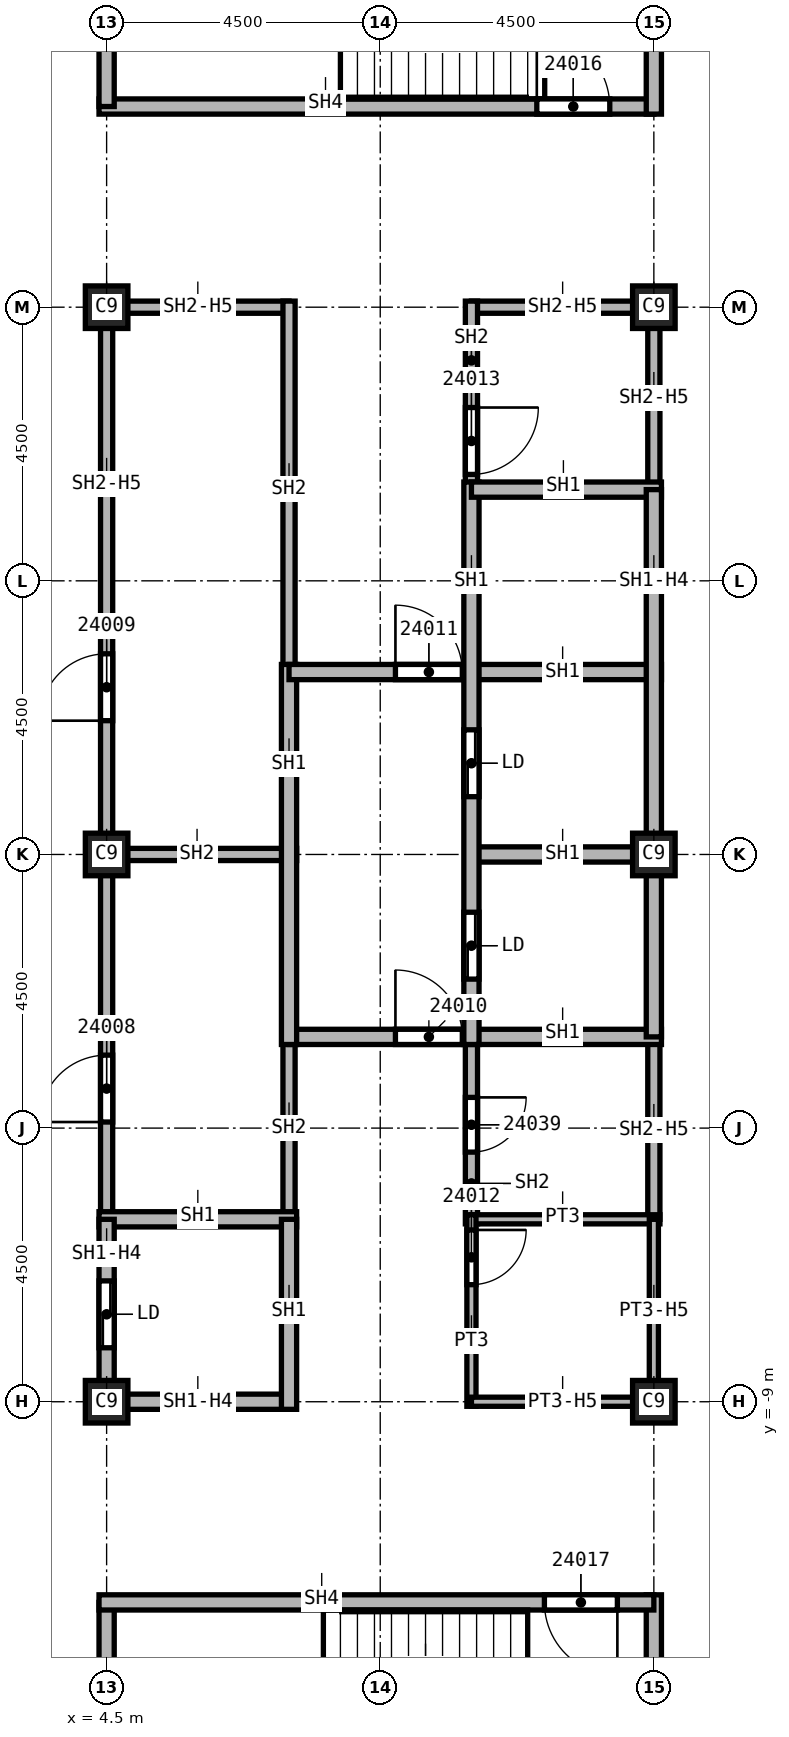
"""IFC4 building model, lengths in metres.
Left out: names, types, materials, properties, quantities, classifications, styles, units other than length and angle.
Written with IfcOpenShell. Run it as: python <this file> out.ifc"""

import sys

from ifc_helpers import new_model, si_unit, direction, frame, frame_2d, origin, origin_2d, place, context, subcontext, project, spatial, rectangle, extrude, element, fill, save


model = new_model("IFC4")
c1 = context("Model", 3, precision=1e-05, world=origin(), true_north=direction((0.0, 1.0)))
c2 = subcontext(c1, "Body", "Model", "MODEL_VIEW")
j1 = project(units=[si_unit("LENGTHUNIT", "METRE"), si_unit("PLANEANGLEUNIT", "RADIAN")], contexts=[c1])
p1 = place(None, origin())
s1 = spatial("IfcSite", under=j1, at=p1, CompositionType="ELEMENT")
p2 = place(p1, origin())
s2 = spatial("IfcBuilding", under=s1, at=p2, CompositionType="ELEMENT")
p3 = place(p2, frame((0.0, 0.0, 346.0)))
s3 = spatial("IfcBuildingStorey", under=s2, at=p3, CompositionType="ELEMENT", Elevation=346.0)
for number, where, z_axis, x_axis in (
    (1, (4.5, 0.0, 0.0), (0.0, 0.0, 1.0), (1.0, 0.0, 0.0)),
    (2, (4.5, 9.0, 0.0), (0.0, 0.0, 1.0), (1.0, 0.0, 0.0)),
    (3, (4.5, -9.0, 0.0), (0.0, 0.0, 1.0), (1.0, 0.0, 0.0)),
    (4, (13.5, 0.0, 0.0), (0.0, 0.0, 1.0), (1.0, 0.0, 0.0)),
    (5, (13.5, 9.0, 0.0), (0.0, 0.0, 1.0), (1.0, 0.0, 0.0)),
    (6, (13.5, -9.0, 0.0), (0.0, 0.0, 1.0), (1.0, 0.0, 0.0)),
):
    element("IfcColumn", number, at=place(p3, frame(where, z_axis=z_axis, x_axis=x_axis)), inside=s3, PredefinedType="COLUMN", context=c2, shape_type="SweptSolid", body=[
        extrude(rectangle(XDim=0.7, YDim=0.7, at=origin_2d()), origin(), (0.0, 0.0, 1.0), 3.59),
    ])
p4 = place(p3, frame((4.4, 0.0, 0.0), z_axis=(0.0, 0.0, 1.0), x_axis=(1.0, 0.0, 0.0)))
e7 = element("IfcWall", 7, at=p4, inside=s3, PredefinedType="SOLIDWALL", context=c2, shape_type="SweptSolid", body=[
    extrude(rectangle(XDim=3.225, YDim=0.2, at=frame_2d((1.613, 0.0))), origin(), (0.0, 0.0, 1.0), 3.59),
])
p5 = place(p3, frame((4.5, -6.0, 0.0), z_axis=(0.0, 0.0, 1.0), x_axis=(0.0, 1.0, 0.0)))
e8 = element("IfcWall", 8, at=p5, inside=s3, PredefinedType="SOLIDWALL", context=c2, shape_type="SweptSolid", body=[
    extrude(rectangle(XDim=15.1, YDim=0.2, at=frame_2d((7.55, 0.0))), origin(), (0.0, 0.0, 1.0), 2.828),
])
p6 = place(p5, frame((1.6, 0.0, 0.0)))
e9 = element("IfcOpeningElement", 9, at=p6, cuts=e8, PredefinedType="OPENING", context=c2, shape_type="SweptSolid", body=[
    extrude(rectangle(XDim=1.1, YDim=2.1, at=frame_2d((0.55, 1.05))), frame((0.0, 0.1, 0.0), z_axis=(0.0, -1.0, 0.0), x_axis=(1.0, 0.0, 0.0)), (0.0, 0.0, 1.0), 0.2),
])
p7 = place(p5, frame((8.2, 0.0, 0.0)))
e10 = element("IfcOpeningElement", 10, at=p7, cuts=e8, PredefinedType="OPENING", context=c2, shape_type="SweptSolid", body=[
    extrude(rectangle(XDim=1.1, YDim=2.1, at=frame_2d((0.55, 1.05))), frame((0.0, 0.1, 0.0), z_axis=(0.0, -1.0, 0.0), x_axis=(1.0, 0.0, 0.0)), (0.0, 0.0, 1.0), 0.2),
])
p8 = place(p3, frame((4.5, 9.0, 0.0), z_axis=(0.0, 0.0, 1.0), x_axis=(1.0, 0.0, 0.0)))
e11 = element("IfcWall", 11, at=p8, inside=s3, PredefinedType="SOLIDWALL", context=c2, shape_type="SweptSolid", body=[
    extrude(rectangle(XDim=3.0, YDim=0.2, at=frame_2d((1.5, 0.0))), origin(), (0.0, 0.0, 1.0), 2.828),
])
p9 = place(p3, frame((7.5, -2.875, 0.0), z_axis=(0.0, 0.0, 1.0), x_axis=(0.0, -1.0, 0.0)))
e12 = element("IfcWall", 12, at=p9, inside=s3, PredefinedType="SOLIDWALL", context=c2, shape_type="SweptSolid", body=[
    extrude(rectangle(XDim=3.125, YDim=0.2, at=frame_2d((1.562, 0.0))), origin(), (0.0, 0.0, 1.0), 3.59),
])
p10 = place(p3, frame((7.5, 9.1, 0.0), z_axis=(0.0, 0.0, 1.0), x_axis=(0.0, -1.0, 0.0)))
e13 = element("IfcWall", 13, at=p10, inside=s3, PredefinedType="SOLIDWALL", context=c2, shape_type="SweptSolid", body=[
    extrude(rectangle(XDim=6.225, YDim=0.2, at=frame_2d((3.113, 0.0))), origin(), (0.0, 0.0, 1.0), 3.59),
])
p11 = place(p3, frame((10.5, -2.875, 0.0), z_axis=(0.0, 0.0, 1.0), x_axis=(0.0, -1.0, 0.0)))
e14 = element("IfcWall", 14, at=p11, inside=s3, PredefinedType="SOLIDWALL", context=c2, shape_type="SweptSolid", body=[
    extrude(rectangle(XDim=3.2, YDim=0.2, at=frame_2d((1.6, 0.0))), origin(), (0.0, 0.0, 1.0), 3.59),
])
p12 = place(p11, frame((1.12, 0.0, 0.0)))
e15 = element("IfcOpeningElement", 15, at=p12, cuts=e14, PredefinedType="OPENING", context=c2, shape_type="SweptSolid", body=[
    extrude(rectangle(XDim=0.9, YDim=2.1, at=frame_2d((0.45, 1.05))), frame((0.0, 0.1, 0.0), z_axis=(0.0, -1.0, 0.0), x_axis=(1.0, 0.0, 0.0)), (0.0, 0.0, 1.0), 0.2),
])
p13 = place(p3, frame((10.5, 9.0, 0.0), z_axis=(0.0, 0.0, 1.0), x_axis=(1.0, 0.0, 0.0)))
e16 = element("IfcWall", 16, at=p13, inside=s3, PredefinedType="SOLIDWALL", context=c2, shape_type="SweptSolid", body=[
    extrude(rectangle(XDim=3.0, YDim=0.2, at=frame_2d((1.5, 0.0))), origin(), (0.0, 0.0, 1.0), 2.828),
])
p14 = place(p3, frame((10.5, 9.1, 0.0), z_axis=(0.0, 0.0, 1.0), x_axis=(0.0, -1.0, 0.0)))
e17 = element("IfcWall", 17, at=p14, inside=s3, PredefinedType="SOLIDWALL", context=c2, shape_type="SweptSolid", body=[
    extrude(rectangle(XDim=3.225, YDim=0.2, at=frame_2d((1.613, 0.0))), origin(), (0.0, 0.0, 1.0), 3.59),
])
p15 = place(p14, frame((1.75, 0.0, 0.0)))
e18 = element("IfcOpeningElement", 18, at=p15, cuts=e17, PredefinedType="OPENING", context=c2, shape_type="SweptSolid", body=[
    extrude(rectangle(XDim=1.1, YDim=2.1, at=frame_2d((0.55, 1.05))), frame((0.0, 0.1, 0.0), z_axis=(0.0, -1.0, 0.0), x_axis=(1.0, 0.0, 0.0)), (0.0, 0.0, 1.0), 0.2),
])
p16 = place(p3, frame((13.5, -3.0, 0.0), z_axis=(0.0, 0.0, 1.0), x_axis=(0.0, -1.0, 0.0)))
e19 = element("IfcWall", 19, at=p16, inside=s3, PredefinedType="SOLIDWALL", context=c2, shape_type="SweptSolid", body=[
    extrude(rectangle(XDim=3.0, YDim=0.2, at=frame_2d((1.5, 0.0))), origin(), (0.0, 0.0, 1.0), 2.828),
])
p17 = place(p3, frame((13.5, 9.1, 0.0), z_axis=(0.0, 0.0, 1.0), x_axis=(0.0, -1.0, 0.0)))
e20 = element("IfcWall", 20, at=p17, inside=s3, PredefinedType="SOLIDWALL", context=c2, shape_type="SweptSolid", body=[
    extrude(rectangle(XDim=3.1, YDim=0.2, at=frame_2d((1.55, 0.0))), origin(), (0.0, 0.0, 1.0), 2.828),
])
p18 = place(p3, frame((4.375, -6.0, 0.0), z_axis=(0.0, 0.0, 1.0), x_axis=(1.0, 0.0, 0.0)))
e21 = element("IfcWall", 21, at=p18, inside=s3, PredefinedType="SOLIDWALL", context=c2, shape_type="SweptSolid", body=[
    extrude(rectangle(XDim=3.25, YDim=0.25, at=frame_2d((1.625, 0.0))), origin(), (0.0, 0.0, 1.0), 3.59),
])
p19 = place(p3, frame((4.5, -9.125, 0.0), z_axis=(0.0, 0.0, 1.0), x_axis=(0.0, 1.0, 0.0)))
e22 = element("IfcWall", 22, at=p19, inside=s3, PredefinedType="SOLIDWALL", context=c2, shape_type="SweptSolid", body=[
    extrude(rectangle(XDim=3.125, YDim=0.25, at=frame_2d((1.562, 0.0))), origin(), (0.0, 0.0, 1.0), 2.828),
])
p20 = place(p19, frame((1.012, 0.0, 0.0)))
e23 = element("IfcOpeningElement", 23, at=p20, cuts=e22, PredefinedType="OPENING", context=c2, shape_type="SweptSolid", body=[
    extrude(rectangle(XDim=1.1, YDim=2.1, at=frame_2d((0.55, 1.05))), frame((0.0, 0.125, 0.0), z_axis=(0.0, -1.0, 0.0), x_axis=(1.0, 0.0, 0.0)), (0.0, 0.0, 1.0), 0.25),
])
p21 = place(p3, frame((7.5, -9.0, 0.0), z_axis=(0.0, 0.0, 1.0), x_axis=(-1.0, 0.0, 0.0)))
e24 = element("IfcWall", 24, at=p21, inside=s3, PredefinedType="SOLIDWALL", context=c2, shape_type="SweptSolid", body=[
    extrude(rectangle(XDim=3.0, YDim=0.25, at=frame_2d((1.5, 0.0))), origin(), (0.0, 0.0, 1.0), 2.828),
])
p22 = place(p3, frame((7.5, -6.0, 0.0), z_axis=(0.0, 0.0, 1.0), x_axis=(0.0, -1.0, 0.0)))
e25 = element("IfcWall", 25, at=p22, inside=s3, PredefinedType="SOLIDWALL", context=c2, shape_type="SweptSolid", body=[
    extrude(rectangle(XDim=3.125, YDim=0.25, at=frame_2d((1.562, 0.0))), origin(), (0.0, 0.0, 1.0), 3.59),
])
p23 = place(p3, frame((7.5, -3.0, 0.0), z_axis=(0.0, 0.0, 1.0), x_axis=(1.0, 0.0, 0.0)))
e26 = element("IfcWall", 26, at=p23, inside=s3, PredefinedType="SOLIDWALL", context=c2, shape_type="SweptSolid", body=[
    extrude(rectangle(XDim=6.125, YDim=0.25, at=frame_2d((3.062, 0.0))), origin(), (0.0, 0.0, 1.0), 3.59),
])
p24 = place(p23, frame((1.75, 0.0, 0.0)))
e27 = element("IfcOpeningElement", 27, at=p24, cuts=e26, PredefinedType="OPENING", context=c2, shape_type="SweptSolid", body=[
    extrude(rectangle(XDim=1.1, YDim=2.1, at=frame_2d((0.55, 1.05))), frame((0.0, 0.125, 0.0), z_axis=(0.0, -1.0, 0.0), x_axis=(1.0, 0.0, 0.0)), (0.0, 0.0, 1.0), 0.25),
])
p25 = place(p3, frame((7.5, 3.125, 0.0), z_axis=(0.0, 0.0, 1.0), x_axis=(0.0, -1.0, 0.0)))
e28 = element("IfcWall", 28, at=p25, inside=s3, PredefinedType="SOLIDWALL", context=c2, shape_type="SweptSolid", body=[
    extrude(rectangle(XDim=6.25, YDim=0.25, at=frame_2d((3.125, 0.0))), origin(), (0.0, 0.0, 1.0), 3.59),
])
p26 = place(p3, frame((7.5, 3.0, 0.0), z_axis=(0.0, 0.0, 1.0), x_axis=(1.0, 0.0, 0.0)))
e29 = element("IfcWall", 29, at=p26, inside=s3, PredefinedType="SOLIDWALL", context=c2, shape_type="SweptSolid", body=[
    extrude(rectangle(XDim=6.125, YDim=0.25, at=frame_2d((3.062, 0.0))), origin(), (0.0, 0.0, 1.0), 3.59),
])
p27 = place(p26, frame((1.75, 0.0, 0.0)))
e30 = element("IfcOpeningElement", 30, at=p27, cuts=e29, PredefinedType="OPENING", context=c2, shape_type="SweptSolid", body=[
    extrude(rectangle(XDim=1.1, YDim=2.1, at=frame_2d((0.55, 1.05))), frame((0.0, 0.125, 0.0), z_axis=(0.0, -1.0, 0.0), x_axis=(1.0, 0.0, 0.0)), (0.0, 0.0, 1.0), 0.25),
])
p28 = place(p3, frame((10.5, 0.0, 0.0), z_axis=(0.0, 0.0, 1.0), x_axis=(1.0, 0.0, 0.0)))
e31 = element("IfcWall", 31, at=p28, inside=s3, PredefinedType="SOLIDWALL", context=c2, shape_type="SweptSolid", body=[
    extrude(rectangle(XDim=3.125, YDim=0.25, at=frame_2d((1.562, 0.0))), origin(), (0.0, 0.0, 1.0), 3.59),
])
p29 = place(p3, frame((10.5, 6.125, 0.0), z_axis=(0.0, 0.0, 1.0), x_axis=(0.0, -1.0, 0.0)))
e32 = element("IfcWall", 32, at=p29, inside=s3, PredefinedType="SOLIDWALL", context=c2, shape_type="SweptSolid", body=[
    extrude(rectangle(XDim=9.25, YDim=0.25, at=frame_2d((4.625, 0.0))), origin(), (0.0, 0.0, 1.0), 3.59),
])
p30 = place(p29, frame((7.075, 0.0, 0.0)))
e33 = element("IfcOpeningElement", 33, at=p30, cuts=e32, PredefinedType="OPENING", context=c2, shape_type="SweptSolid", body=[
    extrude(rectangle(XDim=1.1, YDim=2.1, at=frame_2d((0.55, 1.05))), frame((0.0, 0.125, 0.0), z_axis=(0.0, -1.0, 0.0), x_axis=(1.0, 0.0, 0.0)), (0.0, 0.0, 1.0), 0.25),
])
p31 = place(p29, frame((4.075, 0.0, 0.0)))
e34 = element("IfcOpeningElement", 34, at=p31, cuts=e32, PredefinedType="OPENING", context=c2, shape_type="SweptSolid", body=[
    extrude(rectangle(XDim=1.1, YDim=2.1, at=frame_2d((0.55, 1.05))), frame((0.0, 0.125, 0.0), z_axis=(0.0, -1.0, 0.0), x_axis=(1.0, 0.0, 0.0)), (0.0, 0.0, 1.0), 0.25),
])
p32 = place(p3, frame((10.5, 6.0, 0.0), z_axis=(0.0, 0.0, 1.0), x_axis=(1.0, 0.0, 0.0)))
e35 = element("IfcWall", 35, at=p32, inside=s3, PredefinedType="SOLIDWALL", context=c2, shape_type="SweptSolid", body=[
    extrude(rectangle(XDim=3.125, YDim=0.25, at=frame_2d((1.562, 0.0))), origin(), (0.0, 0.0, 1.0), 3.59),
])
p33 = place(p3, frame((13.5, 6.0, 0.0), z_axis=(0.0, 0.0, 1.0), x_axis=(0.0, -1.0, 0.0)))
e36 = element("IfcWall", 36, at=p33, inside=s3, PredefinedType="SOLIDWALL", context=c2, shape_type="SweptSolid", body=[
    extrude(rectangle(XDim=9.0, YDim=0.25, at=frame_2d((4.5, 0.0))), origin(), (0.0, 0.0, 1.0), 2.828),
])
p34 = place(p3, frame((4.375, 12.3, 0.0), z_axis=(0.0, 0.0, 1.0), x_axis=(1.0, 0.0, 0.0)))
e37 = element("IfcWall", 37, at=p34, inside=s3, PredefinedType="SOLIDWALL", context=c2, shape_type="SweptSolid", body=[
    extrude(rectangle(XDim=9.125, YDim=0.25, at=frame_2d((4.562, 0.0))), origin(), (0.0, 0.0, 1.0), 3.59),
])
p35 = place(p34, frame((7.2, 0.0, 0.0)))
e38 = element("IfcOpeningElement", 38, at=p35, cuts=e37, PredefinedType="OPENING", context=c2, shape_type="SweptSolid", body=[
    extrude(rectangle(XDim=1.2, YDim=2.1, at=frame_2d((0.6, 1.05))), frame((0.0, 0.125, 0.0), z_axis=(0.0, -1.0, 0.0), x_axis=(1.0, 0.0, 0.0)), (0.0, 0.0, 1.0), 0.25),
])
for number, where, z_axis, x_axis in (
    (39, (4.5, -16.8, 0.0), (0.0, 0.0, 1.0), (0.0, 1.0, 0.0)),
    (40, (4.5, 12.3, 0.0), (0.0, 0.0, 1.0), (0.0, 1.0, 0.0)),
):
    element("IfcWall", number, at=place(p3, frame(where, z_axis=z_axis, x_axis=x_axis)), inside=s3, PredefinedType="SOLIDWALL", context=c2, shape_type="SweptSolid", body=[
        extrude(rectangle(XDim=4.5, YDim=0.25, at=frame_2d((2.25, 0.0))), origin(), (0.0, 0.0, 1.0), 3.59),
    ])
p36 = place(p3, frame((13.5, -16.925, 0.0), z_axis=(0.0, 0.0, 1.0), x_axis=(0.0, 1.0, 0.0)))
e41 = element("IfcWall", 41, at=p36, inside=s3, PredefinedType="SOLIDWALL", context=c2, shape_type="SweptSolid", body=[
    extrude(rectangle(XDim=4.75, YDim=0.25, at=frame_2d((2.375, 0.0))), origin(), (0.0, 0.0, 1.0), 3.59),
])
p37 = place(p3, frame((13.5, -12.3, 0.0), z_axis=(0.0, 0.0, 1.0), x_axis=(-1.0, 0.0, 0.0)))
e42 = element("IfcWall", 42, at=p37, inside=s3, PredefinedType="SOLIDWALL", context=c2, shape_type="SweptSolid", body=[
    extrude(rectangle(XDim=9.125, YDim=0.25, at=frame_2d((4.562, 0.0))), origin(), (0.0, 0.0, 1.0), 3.59),
])
p38 = place(p37, frame((0.6, 0.0, 0.0)))
e43 = element("IfcOpeningElement", 43, at=p38, cuts=e42, PredefinedType="OPENING", context=c2, shape_type="SweptSolid", body=[
    extrude(rectangle(XDim=1.2, YDim=2.1, at=frame_2d((0.6, 1.05))), frame((0.0, 0.125, 0.0), z_axis=(0.0, -1.0, 0.0), x_axis=(1.0, 0.0, 0.0)), (0.0, 0.0, 1.0), 0.25),
])
p39 = place(p3, frame((13.5, 12.175, 0.0), z_axis=(0.0, 0.0, 1.0), x_axis=(0.0, 1.0, 0.0)))
e44 = element("IfcWall", 44, at=p39, inside=s3, PredefinedType="SOLIDWALL", context=c2, shape_type="SweptSolid", body=[
    extrude(rectangle(XDim=4.75, YDim=0.25, at=frame_2d((2.375, 0.0))), origin(), (0.0, 0.0, 1.0), 3.59),
])
p40 = place(p3, frame((10.5, -6.0, 0.0), z_axis=(0.0, 0.0, 1.0), x_axis=(1.0, 0.0, 0.0)))
e45 = element("IfcWall", 45, at=p40, inside=s3, PredefinedType="PARTITIONING", context=c2, shape_type="SweptSolid", body=[
    extrude(rectangle(XDim=3.1, YDim=0.15, at=frame_2d((1.55, 0.0))), origin(), (0.0, 0.0, 1.0), 3.59),
])
p41 = place(p3, frame((10.5, -5.925, 0.0), z_axis=(0.0, 0.0, 1.0), x_axis=(0.0, -1.0, 0.0)))
e46 = element("IfcWall", 46, at=p41, inside=s3, PredefinedType="PARTITIONING", context=c2, shape_type="SweptSolid", body=[
    extrude(rectangle(XDim=3.15, YDim=0.15, at=frame_2d((1.575, 0.0))), origin(), (0.0, 0.0, 1.0), 3.59),
])
p42 = place(p41, frame((0.25, 0.0, 0.0)))
e47 = element("IfcOpeningElement", 47, at=p42, cuts=e46, PredefinedType="OPENING", context=c2, shape_type="SweptSolid", body=[
    extrude(rectangle(XDim=0.9, YDim=2.1, at=frame_2d((0.45, 1.05))), frame((0.0, 0.075, 0.0), z_axis=(0.0, -1.0, 0.0), x_axis=(1.0, 0.0, 0.0)), (0.0, 0.0, 1.0), 0.15),
])
p43 = place(p3, frame((13.5, -9.0, 0.0), z_axis=(0.0, 0.0, 1.0), x_axis=(-1.0, 0.0, 0.0)))
e48 = element("IfcWall", 48, at=p43, inside=s3, PredefinedType="PARTITIONING", context=c2, shape_type="SweptSolid", body=[
    extrude(rectangle(XDim=3.0, YDim=0.15, at=frame_2d((1.5, 0.0))), origin(), (0.0, 0.0, 1.0), 2.828),
])
p44 = place(p3, frame((13.5, -6.0, 0.0), z_axis=(0.0, 0.0, 1.0), x_axis=(0.0, -1.0, 0.0)))
e49 = element("IfcWall", 49, at=p44, inside=s3, PredefinedType="PARTITIONING", context=c2, shape_type="SweptSolid", body=[
    extrude(rectangle(XDim=3.075, YDim=0.15, at=frame_2d((1.538, 0.0))), origin(), (0.0, 0.0, 1.0), 2.828),
])
p45 = place(p6, origin())
e50 = element("IfcDoor", 50, at=p45, inside=s3, OperationType="SINGLE_SWING_LEFT", PredefinedType="DOOR", context=c2, shape_type="SweptSolid", body=[
    extrude(rectangle(XDim=1.1, YDim=2.1, at=frame_2d((0.55, 1.05))), frame((0.0, 0.025, 0.0), z_axis=(0.0, -1.0, 0.0), x_axis=(1.0, 0.0, 0.0)), (0.0, 0.0, 1.0), 0.05),
])
fill(e9, e50)
p46 = place(p7, origin())
e51 = element("IfcDoor", 51, at=p46, inside=s3, OperationType="SINGLE_SWING_RIGHT", PredefinedType="DOOR", context=c2, shape_type="SweptSolid", body=[
    extrude(rectangle(XDim=1.1, YDim=2.1, at=frame_2d((0.55, 1.05))), frame((0.0, 0.025, 0.0), z_axis=(0.0, -1.0, 0.0), x_axis=(1.0, 0.0, 0.0)), (0.0, 0.0, 1.0), 0.05),
])
fill(e10, e51)
p47 = place(p24, origin())
e52 = element("IfcDoor", 52, at=p47, inside=s3, OperationType="SINGLE_SWING_LEFT", PredefinedType="DOOR", context=c2, shape_type="SweptSolid", body=[
    extrude(rectangle(XDim=1.1, YDim=2.1, at=frame_2d((0.55, 1.05))), frame((0.0, 0.025, 0.0), z_axis=(0.0, -1.0, 0.0), x_axis=(1.0, 0.0, 0.0)), (0.0, 0.0, 1.0), 0.05),
])
fill(e27, e52)
p48 = place(p27, origin())
e53 = element("IfcDoor", 53, at=p48, inside=s3, OperationType="SINGLE_SWING_RIGHT", PredefinedType="DOOR", context=c2, shape_type="SweptSolid", body=[
    extrude(rectangle(XDim=1.1, YDim=2.1, at=frame_2d((0.55, 1.05))), frame((0.0, 0.025, 0.0), z_axis=(0.0, -1.0, 0.0), x_axis=(1.0, 0.0, 0.0)), (0.0, 0.0, 1.0), 0.05),
])
fill(e30, e53)
p49 = place(p42, origin())
e54 = element("IfcDoor", 54, at=p49, inside=s3, OperationType="SINGLE_SWING_LEFT", PredefinedType="DOOR", context=c2, shape_type="SweptSolid", body=[
    extrude(rectangle(XDim=0.9, YDim=2.1, at=frame_2d((0.45, 1.05))), frame((0.0, 0.025, 0.0), z_axis=(0.0, -1.0, 0.0), x_axis=(1.0, 0.0, 0.0)), (0.0, 0.0, 1.0), 0.05),
])
fill(e47, e54)
p50 = place(p15, origin())
e55 = element("IfcDoor", 55, at=p50, inside=s3, OperationType="SINGLE_SWING_RIGHT", PredefinedType="DOOR", context=c2, shape_type="SweptSolid", body=[
    extrude(rectangle(XDim=1.1, YDim=2.1, at=frame_2d((0.55, 1.05))), frame((0.0, 0.025, 0.0), z_axis=(0.0, -1.0, 0.0), x_axis=(1.0, 0.0, 0.0)), (0.0, 0.0, 1.0), 0.05),
])
fill(e18, e55)
p51 = place(p35, origin())
e56 = element("IfcDoor", 56, at=p51, inside=s3, OperationType="SINGLE_SWING_LEFT", PredefinedType="DOOR", context=c2, shape_type="SweptSolid", body=[
    extrude(rectangle(XDim=1.2, YDim=2.1, at=frame_2d((0.6, 1.05))), frame((0.0, 0.025, 0.0), z_axis=(0.0, -1.0, 0.0), x_axis=(1.0, 0.0, 0.0)), (0.0, 0.0, 1.0), 0.05),
])
fill(e38, e56)
p52 = place(p38, origin())
e57 = element("IfcDoor", 57, at=p52, inside=s3, OperationType="SINGLE_SWING_RIGHT", PredefinedType="DOOR", context=c2, shape_type="SweptSolid", body=[
    extrude(rectangle(XDim=1.2, YDim=2.1, at=frame_2d((0.6, 1.05))), frame((0.0, 0.025, 0.0), z_axis=(0.0, -1.0, 0.0), x_axis=(1.0, 0.0, 0.0)), (0.0, 0.0, 1.0), 0.05),
])
fill(e43, e57)
p53 = place(p12, origin())
e58 = element("IfcDoor", 58, at=p53, inside=s3, OperationType="SINGLE_SWING_LEFT", PredefinedType="DOOR", context=c2, shape_type="SweptSolid", body=[
    extrude(rectangle(XDim=0.9, YDim=2.1, at=frame_2d((0.45, 1.05))), frame((0.0, 0.025, 0.0), z_axis=(0.0, -1.0, 0.0), x_axis=(1.0, 0.0, 0.0)), (0.0, 0.0, 1.0), 0.05),
])
fill(e15, e58)
p54 = place(p20, origin())
e59 = element("IfcDoor", 59, at=p54, inside=s3, OperationType="SLIDING_TO_LEFT", PredefinedType="DOOR", context=c2, shape_type="SweptSolid", body=[
    extrude(rectangle(XDim=1.1, YDim=2.1, at=frame_2d((0.55, 1.05))), frame((0.0, 0.025, 0.0), z_axis=(0.0, -1.0, 0.0), x_axis=(1.0, 0.0, 0.0)), (0.0, 0.0, 1.0), 0.05),
])
fill(e23, e59)
p55 = place(p30, origin())
e60 = element("IfcDoor", 60, at=p55, inside=s3, OperationType="SLIDING_TO_LEFT", PredefinedType="DOOR", context=c2, shape_type="SweptSolid", body=[
    extrude(rectangle(XDim=1.1, YDim=2.1, at=frame_2d((0.55, 1.05))), frame((0.0, 0.025, 0.0), z_axis=(0.0, -1.0, 0.0), x_axis=(1.0, 0.0, 0.0)), (0.0, 0.0, 1.0), 0.05),
])
fill(e33, e60)
p56 = place(p31, origin())
e61 = element("IfcDoor", 61, at=p56, inside=s3, OperationType="SLIDING_TO_LEFT", PredefinedType="DOOR", context=c2, shape_type="SweptSolid", body=[
    extrude(rectangle(XDim=1.1, YDim=2.1, at=frame_2d((0.55, 1.05))), frame((0.0, 0.025, 0.0), z_axis=(0.0, -1.0, 0.0), x_axis=(1.0, 0.0, 0.0)), (0.0, 0.0, 1.0), 0.05),
])
fill(e34, e61)
save(model, sys.argv[1])
